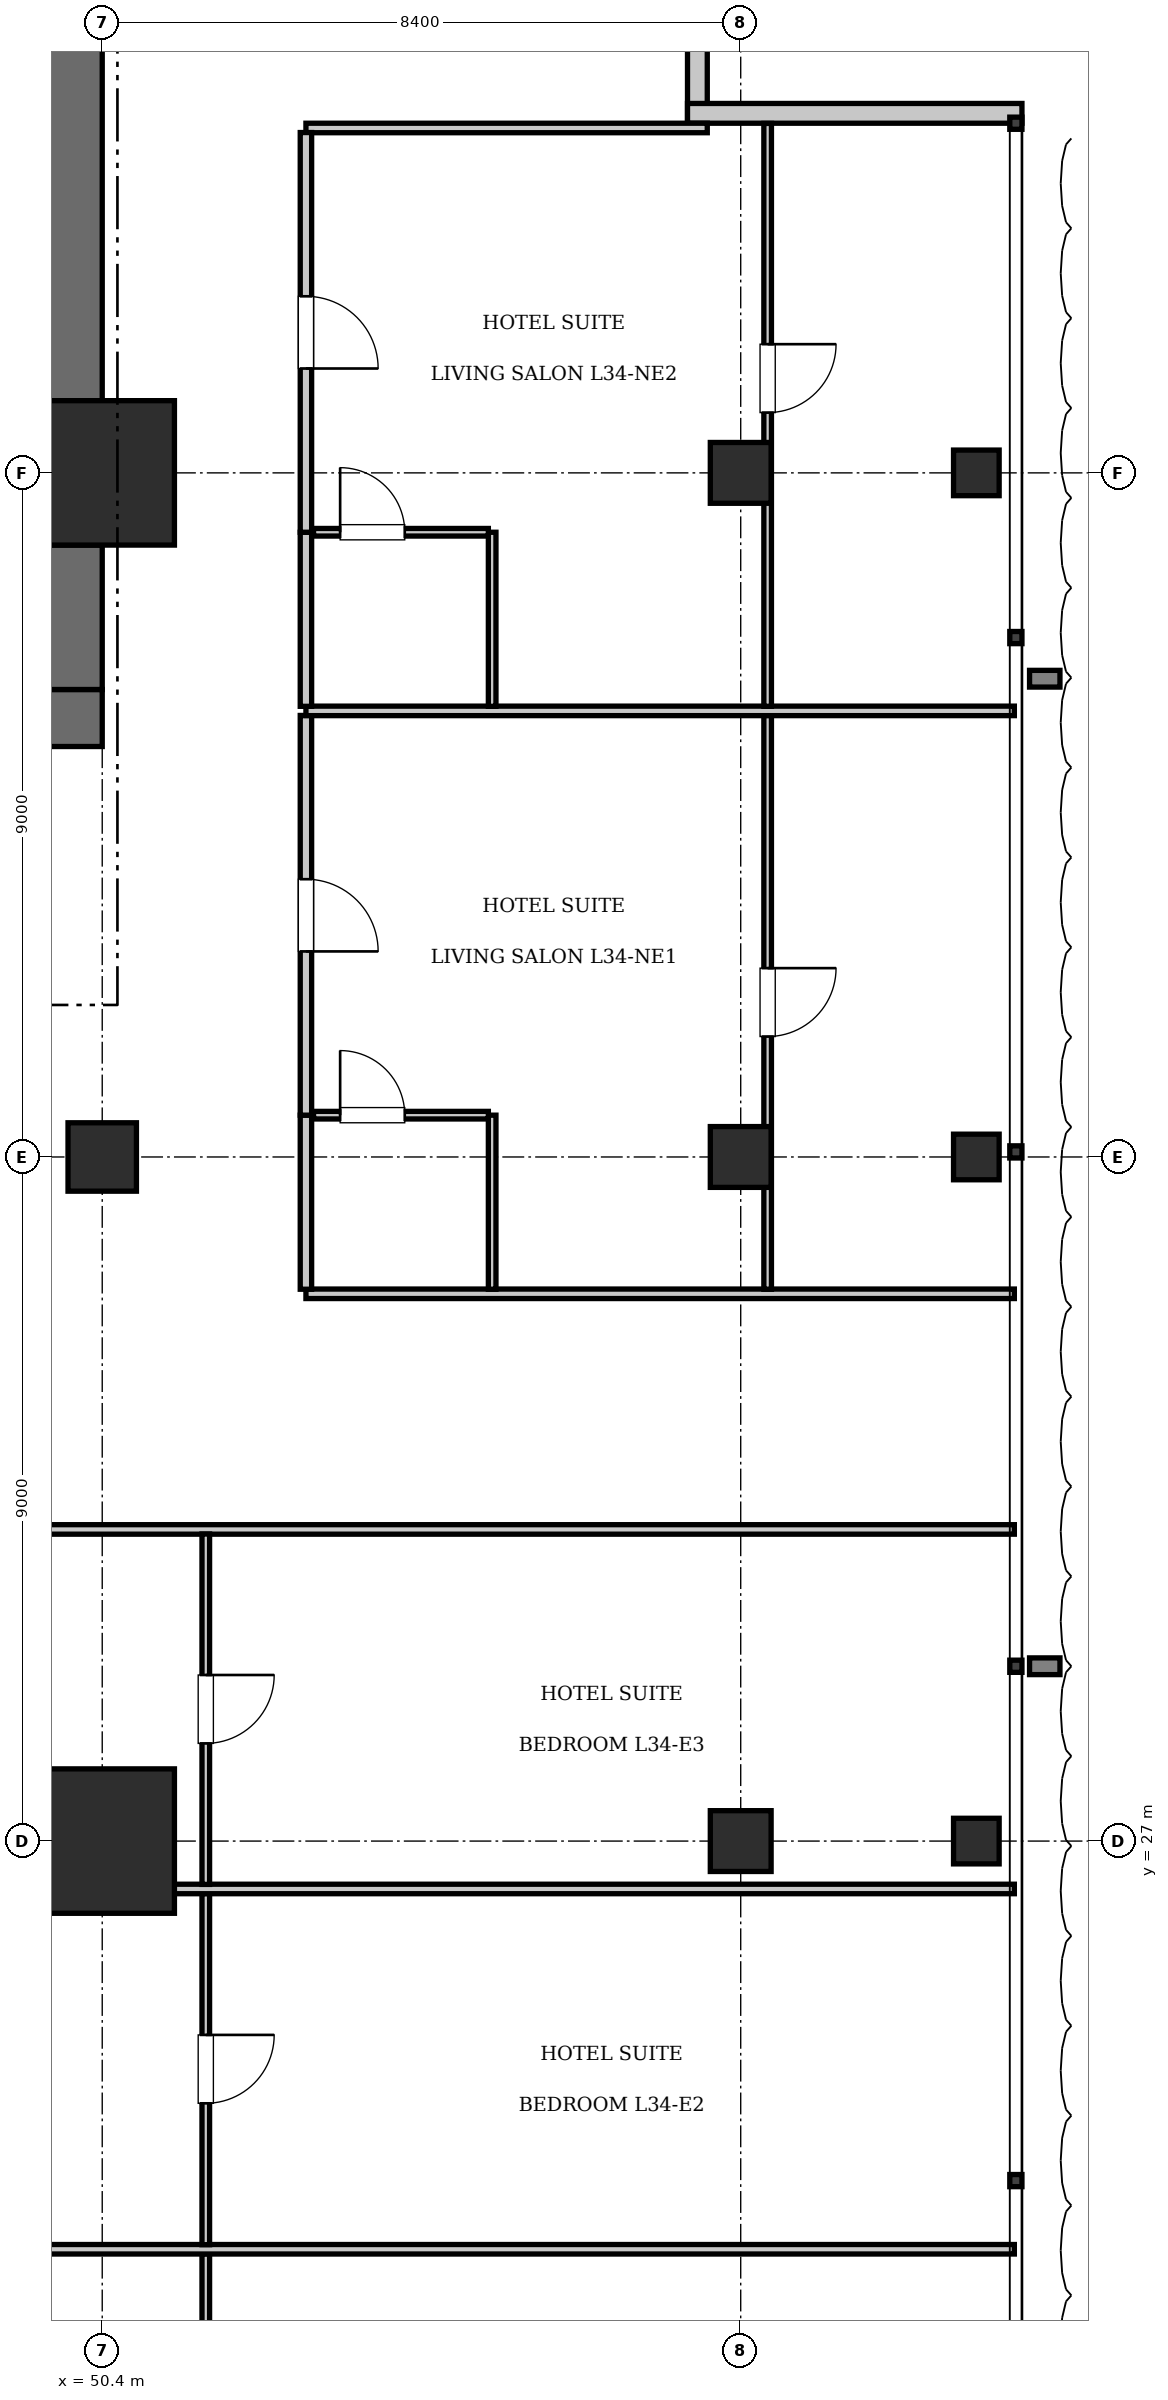
"""IFC4 building model, lengths in metres.
Left out: names, types, materials, properties, quantities, classifications, styles, units other than length and angle.
Written with IfcOpenShell. Run it as: python <this file> out.ifc"""

import sys

from ifc_helpers import new_model, si_unit, direction, frame, frame_2d, origin, origin_2d, place, context, subcontext, project, spatial, rectangle, i_section, extrude, element, fill, save


model = new_model("IFC4")
c1 = context("Model", 3, precision=1e-05, world=origin(), true_north=direction((0.0, 1.0)))
c2 = subcontext(c1, "Body", "Model", "MODEL_VIEW")
j1 = project(units=[si_unit("LENGTHUNIT", "METRE"), si_unit("PLANEANGLEUNIT", "RADIAN")], contexts=[c1])
p1 = place(None, origin())
s1 = spatial("IfcSite", under=j1, at=p1, CompositionType="ELEMENT")
p2 = place(p1, origin())
s2 = spatial("IfcBuilding", under=s1, at=p2, CompositionType="ELEMENT")
p3 = place(p2, frame((0.0, 0.0, 142.8)))
s3 = spatial("IfcBuildingStorey", under=s2, at=p3, CompositionType="ELEMENT", Elevation=142.8)
for number, where, z_axis, x_axis in (
    (1, (50.4, 27.0, 0.0), (0.0, 0.0, 1.0), (1.0, 0.0, 0.0)),
    (2, (50.4, 45.0, 0.0), (0.0, 0.0, 1.0), (1.0, 0.0, 0.0)),
):
    element("IfcColumn", number, at=place(p3, frame(where, z_axis=z_axis, x_axis=x_axis)), inside=s3, PredefinedType="COLUMN", context=c2, shape_type="SweptSolid", body=[
        extrude(rectangle(XDim=1.9, YDim=1.9, at=origin_2d()), origin(), (0.0, 0.0, 1.0), 3.85),
    ])
p4 = place(p3, frame((43.6, 41.775, 0.0), z_axis=(0.0, 0.0, 1.0), x_axis=(1.0, 0.0, 0.0)))
e3 = element("IfcWall", 3, at=p4, inside=s3, PredefinedType="SHEAR", context=c2, shape_type="SweptSolid", body=[
    extrude(rectangle(XDim=6.8, YDim=0.75, at=frame_2d((3.4, 0.0))), origin(), (0.0, 0.0, 1.0), 3.85),
])
p5 = place(p4, frame((3.9, 0.0, 0.0)))
e4 = element("IfcOpeningElement", 4, at=p5, cuts=e3, PredefinedType="OPENING", context=c2, shape_type="SweptSolid", body=[
    extrude(rectangle(XDim=1.15, YDim=2.15, at=frame_2d((0.575, 1.075))), frame((0.0, 0.385, 0.0), z_axis=(0.0, -1.0, 0.0), x_axis=(1.0, 0.0, 0.0)), (0.0, 0.0, 1.0), 0.77),
])
p6 = place(p4, frame((0.55, 0.0, 0.0)))
e5 = element("IfcOpeningElement", 5, at=p6, cuts=e3, PredefinedType="OPENING", context=c2, shape_type="SweptSolid", body=[
    extrude(rectangle(XDim=1.1, YDim=2.2, at=frame_2d((0.55, 1.1))), frame((0.0, 0.385, 0.0), z_axis=(0.0, -1.0, 0.0), x_axis=(1.0, 0.0, 0.0)), (0.0, 0.0, 1.0), 0.77),
])
p7 = place(p3, frame((50.025, 42.15, 0.0), z_axis=(0.0, 0.0, 1.0), x_axis=(0.0, 1.0, 0.0)))
e6 = element("IfcWall", 6, at=p7, inside=s3, PredefinedType="SHEAR", context=c2, shape_type="SweptSolid", body=[
    extrude(rectangle(XDim=1.9, YDim=0.75, at=frame_2d((0.95, 0.0))), origin(), (0.0, 0.0, 1.0), 3.85),
])
p8 = place(p3, frame((50.025, 45.95, 0.0), z_axis=(0.0, 0.0, 1.0), x_axis=(0.0, 1.0, 0.0)))
e7 = element("IfcWall", 7, at=p8, inside=s3, PredefinedType="SHEAR", context=c2, shape_type="SweptSolid", body=[
    extrude(rectangle(XDim=7.3, YDim=0.75, at=frame_2d((3.65, 0.0))), origin(), (0.0, 0.0, 1.0), 3.85),
])
p9 = place(p3, frame((50.4, 36.0, 0.0), z_axis=(0.0, 0.0, 1.0), x_axis=(1.0, 0.0, 0.0)))
e8 = element("IfcColumn", 8, at=p9, inside=s3, PredefinedType="COLUMN", context=c2, shape_type="SweptSolid", body=[
    extrude(rectangle(XDim=0.9, YDim=0.9, at=origin_2d()), origin(), (0.0, 0.0, 1.0), 3.85),
])
for number, where, z_axis, x_axis in (
    (9, (58.8, 27.0, 0.0), (0.0, 0.0, 1.0), (1.0, 0.0, 0.0)),
    (10, (58.8, 36.0, 0.0), (0.0, 0.0, 1.0), (1.0, 0.0, 0.0)),
    (11, (58.8, 45.0, 0.0), (0.0, 0.0, 1.0), (1.0, 0.0, 0.0)),
):
    element("IfcColumn", number, at=place(p3, frame(where, z_axis=z_axis, x_axis=x_axis)), inside=s3, PredefinedType="COLUMN", context=c2, shape_type="SweptSolid", body=[
        extrude(rectangle(XDim=0.8, YDim=0.8, at=origin_2d()), origin(), (0.0, 0.0, 1.0), 3.85),
    ])
for number, where, z_axis, x_axis in (
    (12, (61.9, 27.0, 0.0), (0.0, 0.0, 1.0), (1.0, 0.0, 0.0)),
    (13, (61.9, 36.0, 0.0), (0.0, 0.0, 1.0), (1.0, 0.0, 0.0)),
    (14, (61.9, 45.0, 0.0), (0.0, 0.0, 1.0), (1.0, 0.0, 0.0)),
):
    element("IfcColumn", number, at=place(p3, frame(where, z_axis=z_axis, x_axis=x_axis)), inside=s3, PredefinedType="COLUMN", context=c2, shape_type="SweptSolid", body=[
        extrude(i_section(OverallWidth=0.6, OverallDepth=0.6, WebThickness=0.025, FlangeThickness=0.038, at=origin_2d()), origin(), (0.0, 0.0, 1.0), 3.85),
    ])
for number, where, z_axis, x_axis in (
    (15, (58.23, 54.0, 0.0), (0.0, 0.0, 1.0), (0.0, -1.0, 0.0)),
    (16, (58.1, 49.73, 0.0), (0.0, 0.0, 1.0), (1.0, 0.0, 0.0)),
):
    element("IfcWall", number, at=place(p3, frame(where, z_axis=z_axis, x_axis=x_axis)), inside=s3, PredefinedType="SOLIDWALL", context=c2, shape_type="SweptSolid", body=[
        extrude(rectangle(XDim=4.4, YDim=0.26, at=frame_2d((2.2, 0.0))), origin(), (0.0, 0.0, 1.0), 3.61),
    ])
p10 = place(p3, frame((37.68, 31.1, 0.0), z_axis=(0.0, 0.0, 1.0), x_axis=(1.0, 0.0, 0.0)))
e17 = element("IfcWall", 17, at=p10, inside=s3, PredefinedType="PARTITIONING", context=c2, shape_type="SweptSolid", body=[
    extrude(rectangle(XDim=24.72, YDim=0.125, at=frame_2d((12.36, 0.0))), origin(), (0.0, 0.0, 1.0), 3.61),
])
p11 = place(p3, frame((51.762, 16.96, 0.0), z_axis=(0.0, 0.0, 1.0), x_axis=(0.0, 1.0, 0.0)))
e18 = element("IfcWall", 18, at=p11, inside=s3, PredefinedType="PARTITIONING", context=c2, shape_type="SweptSolid", body=[
    extrude(rectangle(XDim=4.61, YDim=0.1, at=frame_2d((2.305, 0.0))), origin(), (0.0, 0.0, 1.0), 3.61),
])
p12 = place(p11, frame((1.855, 0.0, 0.0)))
e19 = element("IfcOpeningElement", 19, at=p12, cuts=e18, PredefinedType="OPENING", context=c2, shape_type="SweptSolid", body=[
    extrude(rectangle(XDim=0.9, YDim=2.1, at=frame_2d((0.45, 1.05))), frame((0.0, 0.06, 0.0), z_axis=(0.0, -1.0, 0.0), x_axis=(1.0, 0.0, 0.0)), (0.0, 0.0, 1.0), 0.12),
])
p13 = place(p3, frame((37.68, 21.63, 0.0), z_axis=(0.0, 0.0, 1.0), x_axis=(1.0, 0.0, 0.0)))
e20 = element("IfcWall", 20, at=p13, inside=s3, PredefinedType="PARTITIONING", context=c2, shape_type="SweptSolid", body=[
    extrude(rectangle(XDim=24.72, YDim=0.125, at=frame_2d((12.36, 0.0))), origin(), (0.0, 0.0, 1.0), 3.61),
])
p14 = place(p3, frame((51.762, 21.69, 0.0), z_axis=(0.0, 0.0, 1.0), x_axis=(0.0, 1.0, 0.0)))
e21 = element("IfcWall", 21, at=p14, inside=s3, PredefinedType="PARTITIONING", context=c2, shape_type="SweptSolid", body=[
    extrude(rectangle(XDim=4.62, YDim=0.1, at=frame_2d((2.31, 0.0))), origin(), (0.0, 0.0, 1.0), 3.61),
])
p15 = place(p14, frame((1.86, 0.0, 0.0)))
e22 = element("IfcOpeningElement", 22, at=p15, cuts=e21, PredefinedType="OPENING", context=c2, shape_type="SweptSolid", body=[
    extrude(rectangle(XDim=0.9, YDim=2.1, at=frame_2d((0.45, 1.05))), frame((0.0, 0.06, 0.0), z_axis=(0.0, -1.0, 0.0), x_axis=(1.0, 0.0, 0.0)), (0.0, 0.0, 1.0), 0.12),
])
p16 = place(p3, frame((37.68, 26.37, 0.0), z_axis=(0.0, 0.0, 1.0), x_axis=(1.0, 0.0, 0.0)))
e23 = element("IfcWall", 23, at=p16, inside=s3, PredefinedType="PARTITIONING", context=c2, shape_type="SweptSolid", body=[
    extrude(rectangle(XDim=24.72, YDim=0.125, at=frame_2d((12.36, 0.0))), origin(), (0.0, 0.0, 1.0), 3.61),
])
p17 = place(p3, frame((51.762, 26.43, 0.0), z_axis=(0.0, 0.0, 1.0), x_axis=(0.0, 1.0, 0.0)))
e24 = element("IfcWall", 24, at=p17, inside=s3, PredefinedType="PARTITIONING", context=c2, shape_type="SweptSolid", body=[
    extrude(rectangle(XDim=4.61, YDim=0.1, at=frame_2d((2.305, 0.0))), origin(), (0.0, 0.0, 1.0), 3.61),
])
p18 = place(p17, frame((1.855, 0.0, 0.0)))
e25 = element("IfcOpeningElement", 25, at=p18, cuts=e24, PredefinedType="OPENING", context=c2, shape_type="SweptSolid", body=[
    extrude(rectangle(XDim=0.9, YDim=2.1, at=frame_2d((0.45, 1.05))), frame((0.0, 0.06, 0.0), z_axis=(0.0, -1.0, 0.0), x_axis=(1.0, 0.0, 0.0)), (0.0, 0.0, 1.0), 0.12),
])
p19 = place(p3, frame((53.08, 34.2, 0.0), z_axis=(0.0, 0.0, 1.0), x_axis=(1.0, 0.0, 0.0)))
e26 = element("IfcWall", 26, at=p19, inside=s3, PredefinedType="PARTITIONING", context=c2, shape_type="SweptSolid", body=[
    extrude(rectangle(XDim=9.32, YDim=0.125, at=frame_2d((4.66, 0.0))), origin(), (0.0, 0.0, 1.0), 3.61),
])
p20 = place(p3, frame((53.08, 49.538, 0.0), z_axis=(0.0, 0.0, 1.0), x_axis=(1.0, 0.0, 0.0)))
e27 = element("IfcWall", 27, at=p20, inside=s3, PredefinedType="PARTITIONING", context=c2, shape_type="SweptSolid", body=[
    extrude(rectangle(XDim=5.28, YDim=0.125, at=frame_2d((2.64, 0.0))), origin(), (0.0, 0.0, 1.0), 3.61),
])
p21 = place(p3, frame((53.08, 34.26, 0.0), z_axis=(0.0, 0.0, 1.0), x_axis=(0.0, 1.0, 0.0)))
e28 = element("IfcWall", 28, at=p21, inside=s3, PredefinedType="PARTITIONING", context=c2, shape_type="SweptSolid", body=[
    extrude(rectangle(XDim=2.29, YDim=0.15, at=frame_2d((1.145, 0.0))), origin(), (0.0, 0.0, 1.0), 3.61),
])
p22 = place(p3, frame((53.08, 36.55, 0.0), z_axis=(0.0, 0.0, 1.0), x_axis=(0.0, 1.0, 0.0)))
e29 = element("IfcWall", 29, at=p22, inside=s3, PredefinedType="PARTITIONING", context=c2, shape_type="SweptSolid", body=[
    extrude(rectangle(XDim=5.259, YDim=0.15, at=frame_2d((2.629, 0.0))), origin(), (0.0, 0.0, 1.0), 3.61),
])
p23 = place(p22, frame((2.154, 0.0, 0.0)))
e30 = element("IfcOpeningElement", 30, at=p23, cuts=e29, PredefinedType="OPENING", context=c2, shape_type="SweptSolid", body=[
    extrude(rectangle(XDim=0.95, YDim=2.15, at=frame_2d((0.475, 1.075))), frame((0.0, 0.085, 0.0), z_axis=(0.0, -1.0, 0.0), x_axis=(1.0, 0.0, 0.0)), (0.0, 0.0, 1.0), 0.17),
])
p24 = place(p3, frame((55.53, 34.26, 0.0), z_axis=(0.0, 0.0, 1.0), x_axis=(0.0, 1.0, 0.0)))
e31 = element("IfcWall", 31, at=p24, inside=s3, PredefinedType="PARTITIONING", context=c2, shape_type="SweptSolid", body=[
    extrude(rectangle(XDim=2.29, YDim=0.1, at=frame_2d((1.145, 0.0))), origin(), (0.0, 0.0, 1.0), 3.61),
])
p25 = place(p3, frame((53.18, 36.55, 0.0), z_axis=(0.0, 0.0, 1.0), x_axis=(1.0, 0.0, 0.0)))
e32 = element("IfcWall", 32, at=p25, inside=s3, PredefinedType="PARTITIONING", context=c2, shape_type="SweptSolid", body=[
    extrude(rectangle(XDim=2.3, YDim=0.1, at=frame_2d((1.15, 0.0))), origin(), (0.0, 0.0, 1.0), 3.61),
])
p26 = place(p25, frame((0.35, 0.0, 0.0)))
e33 = element("IfcOpeningElement", 33, at=p26, cuts=e32, PredefinedType="OPENING", context=c2, shape_type="SweptSolid", body=[
    extrude(rectangle(XDim=0.85, YDim=2.1, at=frame_2d((0.425, 1.05))), frame((0.0, 0.06, 0.0), z_axis=(0.0, -1.0, 0.0), x_axis=(1.0, 0.0, 0.0)), (0.0, 0.0, 1.0), 0.12),
])
p27 = place(p3, frame((59.154, 34.26, 0.0), z_axis=(0.0, 0.0, 1.0), x_axis=(0.0, 1.0, 0.0)))
e34 = element("IfcWall", 34, at=p27, inside=s3, PredefinedType="PARTITIONING", context=c2, shape_type="SweptSolid", body=[
    extrude(rectangle(XDim=7.549, YDim=0.1, at=frame_2d((3.774, 0.0))), origin(), (0.0, 0.0, 1.0), 3.61),
])
p28 = place(p27, frame((3.324, 0.0, 0.0)))
e35 = element("IfcOpeningElement", 35, at=p28, cuts=e34, PredefinedType="OPENING", context=c2, shape_type="SweptSolid", body=[
    extrude(rectangle(XDim=0.9, YDim=2.1, at=frame_2d((0.45, 1.05))), frame((0.0, 0.06, 0.0), z_axis=(0.0, -1.0, 0.0), x_axis=(1.0, 0.0, 0.0)), (0.0, 0.0, 1.0), 0.12),
])
p29 = place(p3, frame((53.08, 41.869, 0.0), z_axis=(0.0, 0.0, 1.0), x_axis=(1.0, 0.0, 0.0)))
e36 = element("IfcWall", 36, at=p29, inside=s3, PredefinedType="PARTITIONING", context=c2, shape_type="SweptSolid", body=[
    extrude(rectangle(XDim=9.32, YDim=0.125, at=frame_2d((4.66, 0.0))), origin(), (0.0, 0.0, 1.0), 3.61),
])
p30 = place(p3, frame((53.08, 41.929, 0.0), z_axis=(0.0, 0.0, 1.0), x_axis=(0.0, 1.0, 0.0)))
e37 = element("IfcWall", 37, at=p30, inside=s3, PredefinedType="PARTITIONING", context=c2, shape_type="SweptSolid", body=[
    extrude(rectangle(XDim=2.29, YDim=0.15, at=frame_2d((1.145, 0.0))), origin(), (0.0, 0.0, 1.0), 3.61),
])
p31 = place(p3, frame((53.08, 44.219, 0.0), z_axis=(0.0, 0.0, 1.0), x_axis=(0.0, 1.0, 0.0)))
e38 = element("IfcWall", 38, at=p31, inside=s3, PredefinedType="PARTITIONING", context=c2, shape_type="SweptSolid", body=[
    extrude(rectangle(XDim=5.259, YDim=0.15, at=frame_2d((2.629, 0.0))), origin(), (0.0, 0.0, 1.0), 3.61),
])
p32 = place(p31, frame((2.154, 0.0, 0.0)))
e39 = element("IfcOpeningElement", 39, at=p32, cuts=e38, PredefinedType="OPENING", context=c2, shape_type="SweptSolid", body=[
    extrude(rectangle(XDim=0.95, YDim=2.15, at=frame_2d((0.475, 1.075))), frame((0.0, 0.085, 0.0), z_axis=(0.0, -1.0, 0.0), x_axis=(1.0, 0.0, 0.0)), (0.0, 0.0, 1.0), 0.17),
])
p33 = place(p3, frame((55.53, 41.929, 0.0), z_axis=(0.0, 0.0, 1.0), x_axis=(0.0, 1.0, 0.0)))
e40 = element("IfcWall", 40, at=p33, inside=s3, PredefinedType="PARTITIONING", context=c2, shape_type="SweptSolid", body=[
    extrude(rectangle(XDim=2.29, YDim=0.1, at=frame_2d((1.145, 0.0))), origin(), (0.0, 0.0, 1.0), 3.61),
])
p34 = place(p3, frame((53.18, 44.219, 0.0), z_axis=(0.0, 0.0, 1.0), x_axis=(1.0, 0.0, 0.0)))
e41 = element("IfcWall", 41, at=p34, inside=s3, PredefinedType="PARTITIONING", context=c2, shape_type="SweptSolid", body=[
    extrude(rectangle(XDim=2.3, YDim=0.1, at=frame_2d((1.15, 0.0))), origin(), (0.0, 0.0, 1.0), 3.61),
])
p35 = place(p34, frame((0.35, 0.0, 0.0)))
e42 = element("IfcOpeningElement", 42, at=p35, cuts=e41, PredefinedType="OPENING", context=c2, shape_type="SweptSolid", body=[
    extrude(rectangle(XDim=0.85, YDim=2.1, at=frame_2d((0.425, 1.05))), frame((0.0, 0.06, 0.0), z_axis=(0.0, -1.0, 0.0), x_axis=(1.0, 0.0, 0.0)), (0.0, 0.0, 1.0), 0.12),
])
p36 = place(p3, frame((59.154, 41.929, 0.0), z_axis=(0.0, 0.0, 1.0), x_axis=(0.0, 1.0, 0.0)))
e43 = element("IfcWall", 43, at=p36, inside=s3, PredefinedType="PARTITIONING", context=c2, shape_type="SweptSolid", body=[
    extrude(rectangle(XDim=7.669, YDim=0.1, at=frame_2d((3.834, 0.0))), origin(), (0.0, 0.0, 1.0), 3.61),
])
p37 = place(p36, frame((3.864, 0.0, 0.0)))
e44 = element("IfcOpeningElement", 44, at=p37, cuts=e43, PredefinedType="OPENING", context=c2, shape_type="SweptSolid", body=[
    extrude(rectangle(XDim=0.9, YDim=2.1, at=frame_2d((0.45, 1.05))), frame((0.0, 0.06, 0.0), z_axis=(0.0, -1.0, 0.0), x_axis=(1.0, 0.0, 0.0)), (0.0, 0.0, 1.0), 0.12),
])
p38 = place(p15, frame((0.9, 0.0, 0.0), z_axis=(0.0, 0.0, 1.0), x_axis=(-1.0, 0.0, 0.0)))
e45 = element("IfcDoor", 45, at=p38, inside=s3, OperationType="SINGLE_SWING_LEFT", PredefinedType="DOOR", context=c2, shape_type="SweptSolid", body=[
    extrude(rectangle(XDim=0.9, YDim=2.1, at=frame_2d((0.45, 1.05))), frame((0.0, 0.025, 0.0), z_axis=(0.0, -1.0, 0.0), x_axis=(1.0, 0.0, 0.0)), (0.0, 0.0, 1.0), 0.05),
])
fill(e22, e45)
p39 = place(p18, frame((0.9, 0.0, 0.0), z_axis=(0.0, 0.0, 1.0), x_axis=(-1.0, 0.0, 0.0)))
e46 = element("IfcDoor", 46, at=p39, inside=s3, OperationType="SINGLE_SWING_LEFT", PredefinedType="DOOR", context=c2, shape_type="SweptSolid", body=[
    extrude(rectangle(XDim=0.9, YDim=2.1, at=frame_2d((0.45, 1.05))), frame((0.0, 0.025, 0.0), z_axis=(0.0, -1.0, 0.0), x_axis=(1.0, 0.0, 0.0)), (0.0, 0.0, 1.0), 0.05),
])
fill(e25, e46)
p40 = place(p26, origin())
e47 = element("IfcDoor", 47, at=p40, inside=s3, OperationType="SINGLE_SWING_LEFT", PredefinedType="DOOR", context=c2, shape_type="SweptSolid", body=[
    extrude(rectangle(XDim=0.85, YDim=2.1, at=frame_2d((0.425, 1.05))), frame((0.0, 0.025, 0.0), z_axis=(0.0, -1.0, 0.0), x_axis=(1.0, 0.0, 0.0)), (0.0, 0.0, 1.0), 0.05),
])
fill(e33, e47)
p41 = place(p23, frame((0.95, 0.0, 0.0), z_axis=(0.0, 0.0, 1.0), x_axis=(-1.0, 0.0, 0.0)))
e48 = element("IfcDoor", 48, at=p41, inside=s3, OperationType="SINGLE_SWING_RIGHT", PredefinedType="DOOR", context=c2, shape_type="SweptSolid", body=[
    extrude(rectangle(XDim=0.95, YDim=2.15, at=frame_2d((0.475, 1.075))), frame((0.0, 0.025, 0.0), z_axis=(0.0, -1.0, 0.0), x_axis=(1.0, 0.0, 0.0)), (0.0, 0.0, 1.0), 0.05),
])
fill(e30, e48)
p42 = place(p28, frame((0.9, 0.0, 0.0), z_axis=(0.0, 0.0, 1.0), x_axis=(-1.0, 0.0, 0.0)))
e49 = element("IfcDoor", 49, at=p42, inside=s3, OperationType="SINGLE_SWING_LEFT", PredefinedType="DOOR", context=c2, shape_type="SweptSolid", body=[
    extrude(rectangle(XDim=0.9, YDim=2.1, at=frame_2d((0.45, 1.05))), frame((0.0, 0.025, 0.0), z_axis=(0.0, -1.0, 0.0), x_axis=(1.0, 0.0, 0.0)), (0.0, 0.0, 1.0), 0.05),
])
fill(e35, e49)
p43 = place(p35, origin())
e50 = element("IfcDoor", 50, at=p43, inside=s3, OperationType="SINGLE_SWING_LEFT", PredefinedType="DOOR", context=c2, shape_type="SweptSolid", body=[
    extrude(rectangle(XDim=0.85, YDim=2.1, at=frame_2d((0.425, 1.05))), frame((0.0, 0.025, 0.0), z_axis=(0.0, -1.0, 0.0), x_axis=(1.0, 0.0, 0.0)), (0.0, 0.0, 1.0), 0.05),
])
fill(e42, e50)
p44 = place(p32, frame((0.95, 0.0, 0.0), z_axis=(0.0, 0.0, 1.0), x_axis=(-1.0, 0.0, 0.0)))
e51 = element("IfcDoor", 51, at=p44, inside=s3, OperationType="SINGLE_SWING_RIGHT", PredefinedType="DOOR", context=c2, shape_type="SweptSolid", body=[
    extrude(rectangle(XDim=0.95, YDim=2.15, at=frame_2d((0.475, 1.075))), frame((0.0, 0.025, 0.0), z_axis=(0.0, -1.0, 0.0), x_axis=(1.0, 0.0, 0.0)), (0.0, 0.0, 1.0), 0.05),
])
fill(e39, e51)
p45 = place(p37, frame((0.9, 0.0, 0.0), z_axis=(0.0, 0.0, 1.0), x_axis=(-1.0, 0.0, 0.0)))
e52 = element("IfcDoor", 52, at=p45, inside=s3, OperationType="SINGLE_SWING_LEFT", PredefinedType="DOOR", context=c2, shape_type="SweptSolid", body=[
    extrude(rectangle(XDim=0.9, YDim=2.1, at=frame_2d((0.45, 1.05))), frame((0.0, 0.025, 0.0), z_axis=(0.0, -1.0, 0.0), x_axis=(1.0, 0.0, 0.0)), (0.0, 0.0, 1.0), 0.05),
])
fill(e44, e52)
save(model, sys.argv[1])
